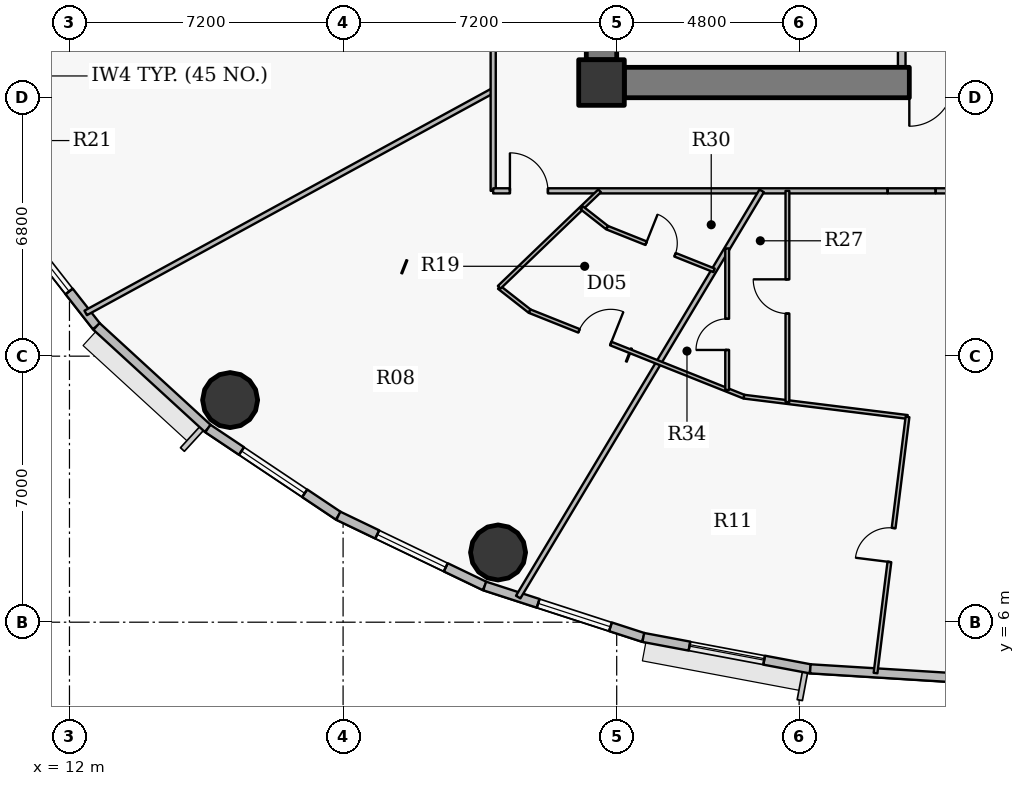
"""IFC4 building model, lengths in metres.
Left out: names, types, materials, properties, quantities, classifications, styles, units other than length and angle.
Written with IfcOpenShell. Run it as: python <this file> out.ifc"""

import sys

from ifc_helpers import new_model, si_unit, direction, frame, frame_2d, origin, origin_2d, place, context, subcontext, project, spatial, rectangle, hollow_circle, extrude, source, transform, mapped, element, fill, save


model = new_model("IFC4")
c1 = context("Model", 3, precision=1e-05, world=origin(), true_north=direction((0.0, 1.0)))
c2 = subcontext(c1, "Body", "Model", "MODEL_VIEW")
j1 = project(units=[si_unit("LENGTHUNIT", "METRE"), si_unit("PLANEANGLEUNIT", "RADIAN")], contexts=[c1])
p1 = place(None, origin())
s1 = spatial("IfcSite", under=j1, at=p1, CompositionType="ELEMENT")
p2 = place(p1, origin())
s2 = spatial("IfcBuilding", under=s1, at=p2, CompositionType="ELEMENT")
p3 = place(p2, frame((0.0, 0.0, 97.2)))
s3 = spatial("IfcBuildingStorey", under=s2, at=p3, CompositionType="ELEMENT", Elevation=97.2)
p4 = place(p3, frame((26.0, 20.2, 0.0), z_axis=(0.0, 0.0, 1.0), x_axis=(1.0, 0.0, 0.0)))
e1 = element("IfcColumn", 1, at=p4, inside=s3, PredefinedType="COLUMN", context=c2, shape_type="SweptSolid", body=[
    extrude(rectangle(XDim=1.2, YDim=1.2, at=origin_2d()), origin(), (0.0, 0.0, 1.0), 3.75),
])
p5 = place(p3, frame((45.4, 20.2, 0.0), z_axis=(0.0, 0.0, 1.0), x_axis=(-1.0, 0.0, 0.0)))
e2 = element("IfcWall", 2, at=p5, inside=s3, PredefinedType="SHEAR", context=c2, shape_type="SweptSolid", body=[
    extrude(rectangle(XDim=18.8, YDim=0.8, at=frame_2d((9.4, 0.0))), origin(), (0.0, 0.0, 1.0), 2.95),
])
p6 = place(p5, frame((10.15, 0.0, 0.0)))
e3 = element("IfcOpeningElement", 3, at=p6, cuts=e2, PredefinedType="OPENING", context=c2, shape_type="SweptSolid", body=[
    extrude(rectangle(XDim=1.15, YDim=2.15, at=origin_2d()), frame((0.575, 0.41, 1.075), z_axis=(0.0, -1.0, 0.0), x_axis=(1.0, 0.0, 0.0)), (0.0, 0.0, 1.0), 0.82),
])
p7 = place(p3, frame((26.0, 20.8, 0.0), z_axis=(0.0, 0.0, 1.0), x_axis=(0.0, 1.0, 0.0)))
e4 = element("IfcWall", 4, at=p7, inside=s3, PredefinedType="SHEAR", context=c2, shape_type="SweptSolid", body=[
    extrude(rectangle(XDim=12.4, YDim=0.8, at=frame_2d((6.2, 0.0))), origin(), (0.0, 0.0, 1.0), 2.95),
])
p8 = place(p7, frame((5.79, 0.0, 0.0)))
e5 = element("IfcOpeningElement", 5, at=p8, cuts=e4, PredefinedType="OPENING", context=c2, shape_type="SweptSolid", body=[
    extrude(rectangle(XDim=0.82, YDim=2.1, at=origin_2d()), frame((0.41, 0.41, 1.05), z_axis=(0.0, -1.0, 0.0), x_axis=(1.0, 0.0, 0.0)), (0.0, 0.0, 1.0), 0.82),
])
for number, where, z_axis, x_axis in (
    (6, (16.227, 11.844, 0.0), (0.0, 0.0, 1.0), (1.0, 0.0, 0.0)),
    (7, (23.278, 7.835, 0.0), (0.0, 0.0, 1.0), (1.0, 0.0, 0.0)),
):
    element("IfcColumn", number, at=place(p3, frame(where, z_axis=z_axis, x_axis=x_axis)), inside=s3, PredefinedType="COLUMN", context=c2, shape_type="SweptSolid", body=[
        extrude(hollow_circle(Radius=0.725, WallThickness=0.042, at=origin_2d()), origin(), (0.0, 0.0, 1.0), 3.75),
    ])
p9 = place(p3, frame((12.711, 13.783, 0.0), z_axis=(0.0, 0.0, 1.0), x_axis=(-0.616272103517, 0.787533297345, 0.0)))
e8 = element("IfcWall", 8, at=p9, inside=s3, PredefinedType="SOLIDWALL", context=c2, shape_type="SweptSolid", body=[
    extrude(rectangle(XDim=3.823, YDim=0.24, at=frame_2d((1.912, 0.0))), origin(), (0.0, 0.0, 1.0), 3.5),
])
p10 = place(p9, frame((1.168, 0.0, 0.9)))
e9 = element("IfcOpeningElement", 9, at=p10, cuts=e8, PredefinedType="OPENING", context=c2, shape_type="SweptSolid", body=[
    extrude(rectangle(XDim=1.25, YDim=1.65, at=origin_2d()), frame((0.625, 0.13, 0.825), z_axis=(0.0, -1.0, 0.0), x_axis=(1.0, 0.0, 0.0)), (0.0, 0.0, 1.0), 0.26),
])
p11 = place(p3, frame((15.642, 11.097, 0.0), z_axis=(0.0, 0.0, 1.0), x_axis=(-0.737113356241, 0.675769117414, 0.0)))
e10 = element("IfcWall", 10, at=p11, inside=s3, PredefinedType="SOLIDWALL", context=c2, shape_type="SweptSolid", body=[
    extrude(rectangle(XDim=3.976, YDim=0.24, at=frame_2d((1.988, 0.0))), origin(), (0.0, 0.0, 1.0), 3.5),
])
p12 = place(p3, frame((19.075, 8.801, 0.0), z_axis=(0.0, 0.0, 1.0), x_axis=(-0.831221811447, 0.555940914284, 0.0)))
e11 = element("IfcWall", 11, at=p12, inside=s3, PredefinedType="SOLIDWALL", context=c2, shape_type="SweptSolid", body=[
    extrude(rectangle(XDim=4.13, YDim=0.24, at=frame_2d((2.065, 0.0))), origin(), (0.0, 0.0, 1.0), 3.5),
])
p13 = place(p12, frame((1.065, 0.0, 0.9)))
e12 = element("IfcOpeningElement", 12, at=p13, cuts=e11, PredefinedType="OPENING", context=c2, shape_type="SweptSolid", body=[
    extrude(rectangle(XDim=2.0, YDim=1.75, at=origin_2d()), frame((1.0, 0.13, 0.875), z_axis=(0.0, -1.0, 0.0), x_axis=(1.0, 0.0, 0.0)), (0.0, 0.0, 1.0), 0.26),
])
p14 = place(p3, frame((22.926, 6.953, 0.0), z_axis=(0.0, 0.0, 1.0), x_axis=(-0.901589935876, 0.432591709962, 0.0)))
e13 = element("IfcWall", 13, at=p14, inside=s3, PredefinedType="SOLIDWALL", context=c2, shape_type="SweptSolid", body=[
    extrude(rectangle(XDim=4.272, YDim=0.24, at=frame_2d((2.136, 0.0))), origin(), (0.0, 0.0, 1.0), 3.5),
])
p15 = place(p14, frame((1.136, 0.0, 0.9)))
e14 = element("IfcOpeningElement", 14, at=p15, cuts=e13, PredefinedType="OPENING", context=c2, shape_type="SweptSolid", body=[
    extrude(rectangle(XDim=2.0, YDim=1.75, at=origin_2d()), frame((1.0, 0.13, 0.875), z_axis=(0.0, -1.0, 0.0), x_axis=(1.0, 0.0, 0.0)), (0.0, 0.0, 1.0), 0.26),
])
p16 = place(p3, frame((27.1, 5.599, 0.0), z_axis=(0.0, 0.0, 1.0), x_axis=(-0.951211346073, 0.308540070495, 0.0)))
e15 = element("IfcWall", 15, at=p16, inside=s3, PredefinedType="SOLIDWALL", context=c2, shape_type="SweptSolid", body=[
    extrude(rectangle(XDim=4.388, YDim=0.24, at=frame_2d((2.194, 0.0))), origin(), (0.0, 0.0, 1.0), 3.5),
])
p17 = place(p16, frame((0.909, 0.0, 0.9)))
e16 = element("IfcOpeningElement", 16, at=p17, cuts=e15, PredefinedType="OPENING", context=c2, shape_type="SweptSolid", body=[
    extrude(rectangle(XDim=2.0, YDim=1.75, at=origin_2d()), frame((1.0, 0.13, 0.875), z_axis=(0.0, -1.0, 0.0), x_axis=(1.0, 0.0, 0.0)), (0.0, 0.0, 1.0), 0.26),
])
p18 = place(p3, frame((31.494, 4.773, 0.0), z_axis=(0.0, 0.0, 1.0), x_axis=(-0.982789252177, 0.184730305596, 0.0)))
e17 = element("IfcWall", 17, at=p18, inside=s3, PredefinedType="SOLIDWALL", context=c2, shape_type="SweptSolid", body=[
    extrude(rectangle(XDim=4.471, YDim=0.24, at=frame_2d((2.235, 0.0))), origin(), (0.0, 0.0, 1.0), 3.5),
])
p19 = place(p18, frame((1.236, 0.0, 0.9)))
e18 = element("IfcOpeningElement", 18, at=p19, cuts=e17, PredefinedType="OPENING", context=c2, shape_type="SweptSolid", body=[
    extrude(rectangle(XDim=2.0, YDim=1.75, at=origin_2d()), frame((1.0, 0.13, 0.875), z_axis=(0.0, -1.0, 0.0), x_axis=(1.0, 0.0, 0.0)), (0.0, 0.0, 1.0), 0.26),
])
p20 = place(p3, frame((36.0, 4.495, 0.0), z_axis=(0.0, 0.0, 1.0), x_axis=(-0.998107531589, 0.061492726276, 0.0)))
e19 = element("IfcWall", 19, at=p20, inside=s3, PredefinedType="SOLIDWALL", context=c2, shape_type="SweptSolid", body=[
    extrude(rectangle(XDim=4.514, YDim=0.24, at=frame_2d((2.257, 0.0))), origin(), (0.0, 0.0, 1.0), 3.5),
])
p21 = place(p3, frame((12.427, 14.138, 0.0), z_axis=(0.0, 0.0, 1.0), x_axis=(0.877835987922, 0.47896135367, 0.0)))
e20 = element("IfcWall", 20, at=p21, inside=s3, PredefinedType="PARTITIONING", context=c2, shape_type="SweptSolid", body=[
    extrude(rectangle(XDim=12.215, YDim=0.135, at=frame_2d((6.107, 0.0))), origin(), (0.0, 0.0, 1.0), 2.935),
])
p22 = place(p3, frame((23.15, 17.35, 0.0), z_axis=(0.0, 0.0, 1.0), x_axis=(0.0, 1.0, 0.0)))
e21 = element("IfcWall", 21, at=p22, inside=s3, PredefinedType="PARTITIONING", context=c2, shape_type="SweptSolid", body=[
    extrude(rectangle(XDim=19.3, YDim=0.135, at=frame_2d((9.65, 0.0))), origin(), (0.0, 0.0, 1.0), 2.935),
])
p23 = place(p22, frame((7.86, 0.0, 0.0)))
e22 = element("IfcOpeningElement", 22, at=p23, cuts=e21, PredefinedType="OPENING", context=c2, shape_type="SweptSolid", body=[
    extrude(rectangle(XDim=1.0, YDim=2.15, at=origin_2d()), frame((0.5, 0.078, 1.075), z_axis=(0.0, -1.0, 0.0), x_axis=(1.0, 0.0, 0.0)), (0.0, 0.0, 1.0), 0.155),
])
p24 = place(p3, frame((23.15, 17.35, 0.0), z_axis=(0.0, 0.0, 1.0), x_axis=(1.0, 0.0, 0.0)))
e23 = element("IfcWall", 23, at=p24, inside=s3, PredefinedType="PARTITIONING", context=c2, shape_type="SweptSolid", body=[
    extrude(rectangle(XDim=10.373, YDim=0.135, at=frame_2d((5.187, 0.0))), origin(), (0.0, 0.0, 1.0), 2.935),
])
p25 = place(p24, frame((0.44, 0.0, 0.0)))
e24 = element("IfcOpeningElement", 24, at=p25, cuts=e23, PredefinedType="OPENING", context=c2, shape_type="SweptSolid", body=[
    extrude(rectangle(XDim=1.0, YDim=2.15, at=origin_2d()), frame((0.5, 0.078, 1.075), z_axis=(0.0, -1.0, 0.0), x_axis=(1.0, 0.0, 0.0)), (0.0, 0.0, 1.0), 0.155),
])
p26 = place(p3, frame((23.307, 14.812, 0.0), z_axis=(0.0, 0.0, 1.0), x_axis=(0.787398737985, -0.616444018075, 0.0)))
e25 = element("IfcWall", 25, at=p26, inside=s3, PredefinedType="PARTITIONING", context=c2, shape_type="SweptSolid", body=[
    extrude(rectangle(XDim=1.018, YDim=0.1, at=frame_2d((0.509, 0.0))), origin(), (0.0, 0.0, 1.0), 3.185),
])
p27 = place(p3, frame((23.307, 14.812, 0.0), z_axis=(0.0, 0.0, 1.0), x_axis=(0.721286127108, 0.692637223113, 0.0)))
e26 = element("IfcWall", 26, at=p27, inside=s3, PredefinedType="PARTITIONING", context=c2, shape_type="SweptSolid", body=[
    extrude(rectangle(XDim=3.664, YDim=0.1, at=frame_2d((1.832, 0.0))), origin(), (0.0, 0.0, 1.0), 3.5),
])
p28 = place(p3, frame((23.808, 6.661, 0.0), z_axis=(0.0, 0.0, 1.0), x_axis=(0.51416439954, 0.857691652195, 0.0)))
e27 = element("IfcWall", 27, at=p28, inside=s3, PredefinedType="PARTITIONING", context=c2, shape_type="SweptSolid", body=[
    extrude(rectangle(XDim=12.462, YDim=0.135, at=frame_2d((6.231, 0.0))), origin(), (0.0, 0.0, 1.0), 2.935),
])
p29 = place(p3, frame((24.109, 14.184, 0.0), z_axis=(0.0, 0.0, 1.0), x_axis=(0.9288090756, -0.370558633798, 0.0)))
e28 = element("IfcWall", 28, at=p29, inside=s3, PredefinedType="PARTITIONING", context=c2, shape_type="SweptSolid", body=[
    extrude(rectangle(XDim=6.072, YDim=0.1, at=frame_2d((3.036, 0.0))), origin(), (0.0, 0.0, 1.0), 2.935),
])
p30 = place(p29, frame((1.398, 0.0, 0.0)))
e29 = element("IfcOpeningElement", 29, at=p30, cuts=e28, PredefinedType="OPENING", context=c2, shape_type="SweptSolid", body=[
    extrude(rectangle(XDim=0.9, YDim=2.1, at=origin_2d()), frame((0.45, 0.06, 1.05), z_axis=(0.0, -1.0, 0.0), x_axis=(1.0, 0.0, 0.0)), (0.0, 0.0, 1.0), 0.12),
])
p31 = place(p3, frame((25.483, 16.901, 0.0), z_axis=(0.0, 0.0, 1.0), x_axis=(0.787321722918, -0.616542378609, 0.0)))
e30 = element("IfcWall", 30, at=p31, inside=s3, PredefinedType="PARTITIONING", context=c2, shape_type="SweptSolid", body=[
    extrude(rectangle(XDim=0.844, YDim=0.1, at=frame_2d((0.422, 0.0))), origin(), (0.0, 0.0, 1.0), 3.5),
])
p32 = place(p3, frame((26.147, 16.381, 0.0), z_axis=(0.0, 0.0, 1.0), x_axis=(0.928793125476, -0.370598610451, 0.0)))
e31 = element("IfcWall", 31, at=p32, inside=s3, PredefinedType="PARTITIONING", context=c2, shape_type="SweptSolid", body=[
    extrude(rectangle(XDim=3.03, YDim=0.1, at=frame_2d((1.515, 0.0))), origin(), (0.0, 0.0, 1.0), 2.935),
])
p33 = place(p32, frame((1.105, 0.0, 0.0)))
e32 = element("IfcOpeningElement", 32, at=p33, cuts=e31, PredefinedType="OPENING", context=c2, shape_type="SweptSolid", body=[
    extrude(rectangle(XDim=0.82, YDim=2.1, at=origin_2d()), frame((0.41, 0.06, 1.05), z_axis=(0.0, -1.0, 0.0), x_axis=(1.0, 0.0, 0.0)), (0.0, 0.0, 1.0), 0.12),
])
p34 = place(p3, frame((29.307, 12.111, 0.0), z_axis=(0.0, 0.0, 1.0), x_axis=(0.0, 1.0, 0.0)))
e33 = element("IfcWall", 33, at=p34, inside=s3, PredefinedType="PARTITIONING", context=c2, shape_type="SweptSolid", body=[
    extrude(rectangle(XDim=3.724, YDim=0.1, at=frame_2d((1.862, 0.0))), origin(), (0.0, 0.0, 1.0), 3.5),
])
p35 = place(p34, frame((1.052, 0.0, 0.0)))
e34 = element("IfcOpeningElement", 34, at=p35, cuts=e33, PredefinedType="OPENING", context=c2, shape_type="SweptSolid", body=[
    extrude(rectangle(XDim=0.82, YDim=2.1, at=origin_2d()), frame((0.41, 0.06, 1.05), z_axis=(0.0, -1.0, 0.0), x_axis=(1.0, 0.0, 0.0)), (0.0, 0.0, 1.0), 0.12),
])
p36 = place(p3, frame((29.749, 11.934, 0.0), z_axis=(0.0, 0.0, 1.0), x_axis=(0.992398657051, -0.123064639455, 0.0)))
e35 = element("IfcWall", 35, at=p36, inside=s3, PredefinedType="PARTITIONING", context=c2, shape_type="SweptSolid", body=[
    extrude(rectangle(XDim=4.337, YDim=0.1, at=frame_2d((2.168, 0.0))), origin(), (0.0, 0.0, 1.0), 3.5),
])
p37 = place(p3, frame((30.892, 11.792, 0.0), z_axis=(0.0, 0.0, 1.0), x_axis=(0.0, 1.0, 0.0)))
e36 = element("IfcWall", 36, at=p37, inside=s3, PredefinedType="PARTITIONING", context=c2, shape_type="SweptSolid", body=[
    extrude(rectangle(XDim=5.558, YDim=0.1, at=frame_2d((2.779, 0.0))), origin(), (0.0, 0.0, 1.0), 3.5),
])
p38 = place(p37, frame((2.329, 0.0, 0.0)))
e37 = element("IfcOpeningElement", 37, at=p38, cuts=e36, PredefinedType="OPENING", context=c2, shape_type="SweptSolid", body=[
    extrude(rectangle(XDim=0.9, YDim=2.1, at=origin_2d()), frame((0.45, 0.06, 1.05), z_axis=(0.0, -1.0, 0.0), x_axis=(1.0, 0.0, 0.0)), (0.0, 0.0, 1.0), 0.12),
])
p39 = place(p3, frame((33.211, 4.662, 0.0), z_axis=(0.0, 0.0, 1.0), x_axis=(0.123884295517, 0.992296670016, 0.0)))
e38 = element("IfcWall", 38, at=p39, inside=s3, PredefinedType="PARTITIONING", context=c2, shape_type="SweptSolid", body=[
    extrude(rectangle(XDim=6.791, YDim=0.1, at=frame_2d((3.396, 0.0))), origin(), (0.0, 0.0, 1.0), 2.935),
])
p40 = place(p39, frame((2.946, 0.0, 0.0)))
e39 = element("IfcOpeningElement", 39, at=p40, cuts=e38, PredefinedType="OPENING", context=c2, shape_type="SweptSolid", body=[
    extrude(rectangle(XDim=0.9, YDim=2.1, at=origin_2d()), frame((0.45, 0.06, 1.05), z_axis=(0.0, -1.0, 0.0), x_axis=(1.0, 0.0, 0.0)), (0.0, 0.0, 1.0), 0.12),
])
p41 = place(p3, frame((33.9, 20.6, 0.0), z_axis=(0.0, 0.0, 1.0), x_axis=(0.0, 1.0, 0.0)))
e40 = element("IfcWall", 40, at=p41, inside=s3, PredefinedType="PARTITIONING", context=c2, shape_type="SweptSolid", body=[
    extrude(rectangle(XDim=11.5, YDim=0.2, at=frame_2d((5.75, 0.0))), origin(), (0.0, 0.0, 1.0), 3.085),
])
p42 = place(p3, frame((34.795, 17.35, 0.0), z_axis=(0.0, 0.0, 1.0), x_axis=(1.0, 0.0, 0.0)))
e41 = element("IfcWall", 41, at=p42, inside=s3, PredefinedType="PARTITIONING", context=c2, shape_type="SweptSolid", body=[
    extrude(rectangle(XDim=14.055, YDim=0.135, at=frame_2d((7.028, 0.0))), origin(), (0.0, 0.0, 1.0), 2.935),
])
p43 = place(p42, frame((1.571, 0.0, 0.0)))
e42 = element("IfcOpeningElement", 42, at=p43, cuts=e41, PredefinedType="OPENING", context=c2, shape_type="SweptSolid", body=[
    extrude(rectangle(XDim=1.0, YDim=2.15, at=origin_2d()), frame((0.5, 0.078, 1.075), z_axis=(0.0, -1.0, 0.0), x_axis=(1.0, 0.0, 0.0)), (0.0, 0.0, 1.0), 0.155),
])
p44 = place(p42, frame((10.976, 0.0, 0.0)))
e43 = element("IfcOpeningElement", 43, at=p44, cuts=e41, PredefinedType="OPENING", context=c2, shape_type="SweptSolid", body=[
    extrude(rectangle(XDim=1.0, YDim=2.15, at=origin_2d()), frame((0.5, 0.078, 1.075), z_axis=(0.0, -1.0, 0.0), x_axis=(1.0, 0.0, 0.0)), (0.0, 0.0, 1.0), 0.155),
])
p45 = place(p3, frame((34.785, 17.35, 0.0), z_axis=(0.0, 0.0, 1.0), x_axis=(-1.0, 0.0, 0.0)))
e44 = element("IfcWall", 44, at=p45, inside=s3, PredefinedType="PARTITIONING", context=c2, shape_type="SweptSolid", body=[
    extrude(rectangle(XDim=1.252, YDim=0.135, at=frame_2d((0.626, 0.0))), origin(), (0.0, 0.0, 1.0), 3.5),
])
p46 = place(p3, frame((25.6, 20.79, 0.0), z_axis=(0.0, 0.0, 1.0), x_axis=(0.0, -1.0, 0.0)))
e45 = element("IfcWall", 45, at=p46, inside=s3, PredefinedType="PARTITIONING", context=c2, shape_type="SweptSolid", body=[
    extrude(rectangle(XDim=0.99, YDim=0.135, at=frame_2d((0.495, 0.0))), origin(), (0.0, 0.0, 1.0), 3.5),
])
p47 = place(p3, frame((25.907, 19.8, 0.0), z_axis=(0.0, 0.0, 1.0), x_axis=(1.0, 0.0, 0.0)))
e46 = element("IfcWall", 46, at=p47, inside=s3, PredefinedType="PARTITIONING", context=c2, shape_type="SweptSolid", body=[
    extrude(rectangle(XDim=0.683, YDim=0.135, at=frame_2d((0.341, 0.0))), origin(), (0.0, 0.0, 1.0), 2.935),
])
m1 = source(origin(), c2, "Body", "SweptSolid", [
    extrude(rectangle(XDim=1.25, YDim=1.65, at=origin_2d()), frame((0.625, 0.03, 0.825), z_axis=(0.0, -1.0, 0.0), x_axis=(1.0, 0.0, 0.0)), (0.0, 0.0, 1.0), 0.06),
])
p48 = place(p10, origin())
e47 = element("IfcWindow", 47, at=p48, inside=s3, PartitioningType="SINGLE_PANEL", PredefinedType="WINDOW", context=c2, shape_type="MappedRepresentation", body=[
    mapped(m1, transform((0.0, 0.0, 0.0), x_axis=(1.0, 0.0, 0.0), y_axis=(0.0, 1.0, 0.0), z_axis=(0.0, 0.0, 1.0), scale=1.0)),
])
fill(e9, e47)
m2 = source(origin(), c2, "Body", "SweptSolid", [
    extrude(rectangle(XDim=2.0, YDim=1.75, at=origin_2d()), frame((1.0, 0.03, 0.875), z_axis=(0.0, -1.0, 0.0), x_axis=(1.0, 0.0, 0.0)), (0.0, 0.0, 1.0), 0.06),
])
p49 = place(p13, origin())
e48 = element("IfcWindow", 48, at=p49, inside=s3, PartitioningType="DOUBLE_PANEL_VERTICAL", PredefinedType="WINDOW", context=c2, shape_type="MappedRepresentation", body=[
    mapped(m2, transform((0.0, 0.0, 0.0), x_axis=(1.0, 0.0, 0.0), y_axis=(0.0, 1.0, 0.0), z_axis=(0.0, 0.0, 1.0), scale=1.0)),
])
fill(e12, e48)
p50 = place(p15, origin())
e49 = element("IfcWindow", 49, at=p50, inside=s3, PartitioningType="DOUBLE_PANEL_VERTICAL", PredefinedType="WINDOW", context=c2, shape_type="MappedRepresentation", body=[
    mapped(m2, transform((0.0, 0.0, 0.0), x_axis=(1.0, 0.0, 0.0), y_axis=(0.0, 1.0, 0.0), z_axis=(0.0, 0.0, 1.0), scale=1.0)),
])
fill(e14, e49)
p51 = place(p17, origin())
e50 = element("IfcWindow", 50, at=p51, inside=s3, PartitioningType="DOUBLE_PANEL_VERTICAL", PredefinedType="WINDOW", context=c2, shape_type="MappedRepresentation", body=[
    mapped(m2, transform((0.0, 0.0, 0.0), x_axis=(1.0, 0.0, 0.0), y_axis=(0.0, 1.0, 0.0), z_axis=(0.0, 0.0, 1.0), scale=1.0)),
])
fill(e16, e50)
p52 = place(p19, origin())
e51 = element("IfcWindow", 51, at=p52, inside=s3, PartitioningType="DOUBLE_PANEL_VERTICAL", PredefinedType="WINDOW", context=c2, shape_type="MappedRepresentation", body=[
    mapped(m2, transform((0.0, 0.0, 0.0), x_axis=(1.0, 0.0, 0.0), y_axis=(0.0, 1.0, 0.0), z_axis=(0.0, 0.0, 1.0), scale=1.0)),
])
fill(e18, e51)
m3 = source(origin(), c2, "Body", "SweptSolid", [
    extrude(rectangle(XDim=1.15, YDim=2.15, at=origin_2d()), frame((0.575, 0.025, 1.075), z_axis=(0.0, -1.0, 0.0), x_axis=(1.0, 0.0, 0.0)), (0.0, 0.0, 1.0), 0.05),
])
p53 = place(p6, origin())
e52 = element("IfcDoor", 52, at=p53, inside=s3, OperationType="SINGLE_SWING_RIGHT", PredefinedType="DOOR", context=c2, shape_type="MappedRepresentation", body=[
    mapped(m3, transform((0.0, 0.0, 0.0), x_axis=(1.0, 0.0, 0.0), y_axis=(0.0, 1.0, 0.0), z_axis=(0.0, 0.0, 1.0), scale=1.0)),
])
fill(e3, e52)
m4 = source(origin(), c2, "Body", "SweptSolid", [
    extrude(rectangle(XDim=1.0, YDim=2.15, at=origin_2d()), frame((0.5, 0.025, 1.075), z_axis=(0.0, -1.0, 0.0), x_axis=(1.0, 0.0, 0.0)), (0.0, 0.0, 1.0), 0.05),
])
p54 = place(p25, origin())
e53 = element("IfcDoor", 53, at=p54, inside=s3, OperationType="SINGLE_SWING_LEFT", PredefinedType="DOOR", context=c2, shape_type="MappedRepresentation", body=[
    mapped(m4, transform((0.0, 0.0, 0.0), x_axis=(1.0, 0.0, 0.0), y_axis=(0.0, 1.0, 0.0), z_axis=(0.0, 0.0, 1.0), scale=1.0)),
])
fill(e24, e53)
m5 = source(origin(), c2, "Body", "SweptSolid", [
    extrude(rectangle(XDim=0.9, YDim=2.1, at=origin_2d()), frame((0.45, 0.025, 1.05), z_axis=(0.0, -1.0, 0.0), x_axis=(1.0, 0.0, 0.0)), (0.0, 0.0, 1.0), 0.05),
])
p55 = place(p30, origin())
e54 = element("IfcDoor", 54, at=p55, inside=s3, OperationType="SINGLE_SWING_RIGHT", PredefinedType="DOOR", context=c2, shape_type="MappedRepresentation", body=[
    mapped(m5, transform((0.0, 0.0, 0.0), x_axis=(1.0, 0.0, 0.0), y_axis=(0.0, 1.0, 0.0), z_axis=(0.0, 0.0, 1.0), scale=1.0)),
])
fill(e29, e54)
m6 = source(origin(), c2, "Body", "SweptSolid", [
    extrude(rectangle(XDim=0.82, YDim=2.1, at=origin_2d()), frame((0.41, 0.025, 1.05), z_axis=(0.0, -1.0, 0.0), x_axis=(1.0, 0.0, 0.0)), (0.0, 0.0, 1.0), 0.05),
])
p56 = place(p33, origin())
e55 = element("IfcDoor", 55, at=p56, inside=s3, OperationType="SINGLE_SWING_LEFT", PredefinedType="DOOR", context=c2, shape_type="MappedRepresentation", body=[
    mapped(m6, transform((0.0, 0.0, 0.0), x_axis=(1.0, 0.0, 0.0), y_axis=(0.0, 1.0, 0.0), z_axis=(0.0, 0.0, 1.0), scale=1.0)),
])
fill(e32, e55)
p57 = place(p40, origin())
e56 = element("IfcDoor", 56, at=p57, inside=s3, OperationType="SINGLE_SWING_LEFT", PredefinedType="DOOR", context=c2, shape_type="MappedRepresentation", body=[
    mapped(m5, transform((0.0, 0.0, 0.0), x_axis=(1.0, 0.0, 0.0), y_axis=(0.0, 1.0, 0.0), z_axis=(0.0, 0.0, 1.0), scale=1.0)),
])
fill(e39, e56)
p58 = place(p38, origin())
e57 = element("IfcDoor", 57, at=p58, inside=s3, OperationType="SINGLE_SWING_RIGHT", PredefinedType="DOOR", context=c2, shape_type="MappedRepresentation", body=[
    mapped(m5, transform((0.0, 0.0, 0.0), x_axis=(1.0, 0.0, 0.0), y_axis=(0.0, 1.0, 0.0), z_axis=(0.0, 0.0, 1.0), scale=1.0)),
])
fill(e37, e57)
p59 = place(p35, origin())
e58 = element("IfcDoor", 58, at=p59, inside=s3, OperationType="SINGLE_SWING_LEFT", PredefinedType="DOOR", context=c2, shape_type="MappedRepresentation", body=[
    mapped(m6, transform((0.0, 0.0, 0.0), x_axis=(1.0, 0.0, 0.0), y_axis=(0.0, 1.0, 0.0), z_axis=(0.0, 0.0, 1.0), scale=1.0)),
])
fill(e34, e58)
save(model, sys.argv[1])
